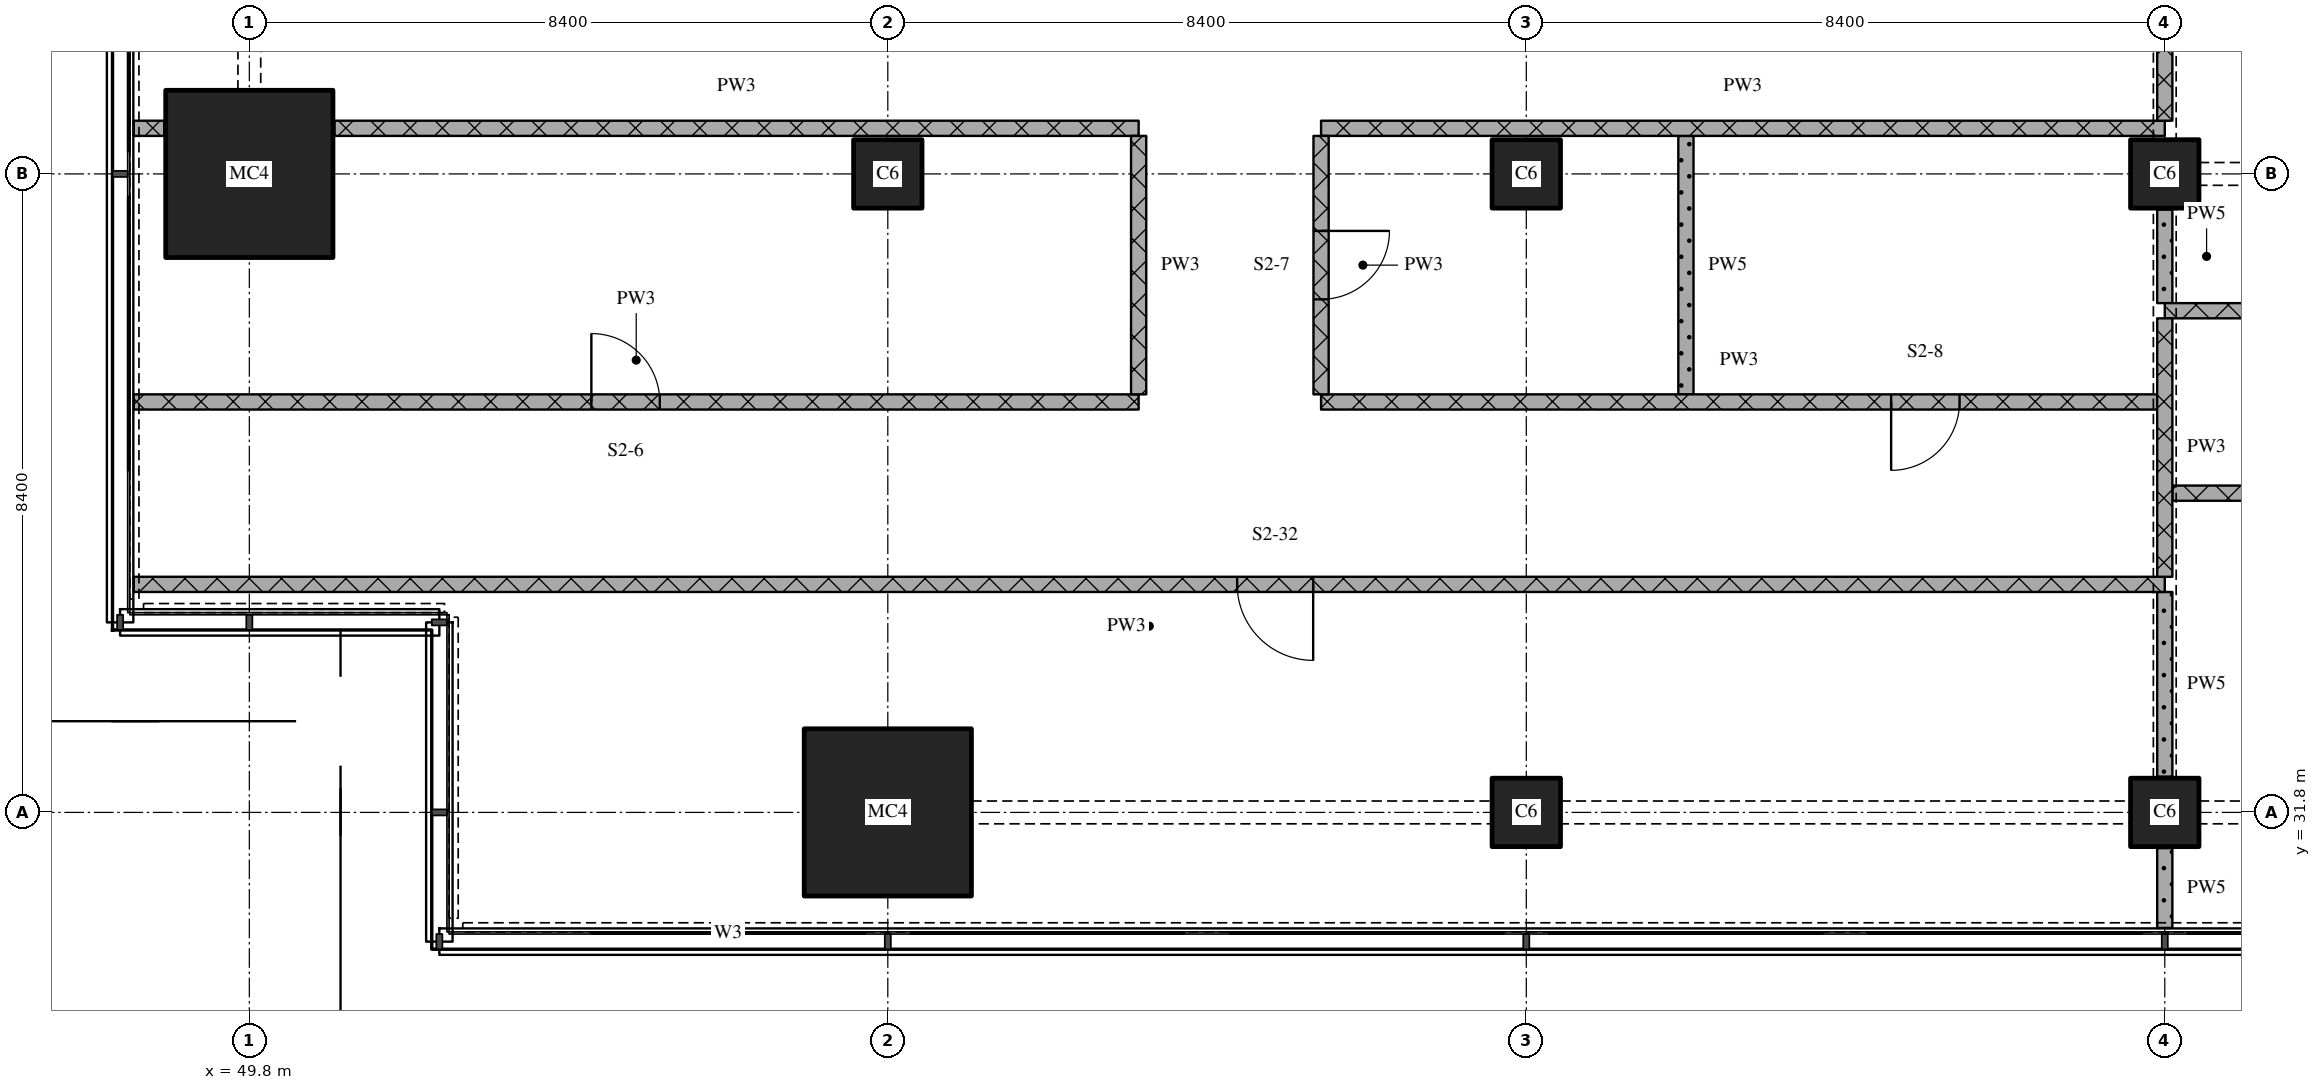
"""IFC4 building model, lengths in metres.
Left out: names, types, materials, properties, quantities, classifications, styles, units other than length and angle.
Written with IfcOpenShell. Run it as: python <this file> out.ifc"""

import sys

from ifc_helpers import new_model, si_unit, direction, frame, frame_2d, origin, origin_2d, place, context, subcontext, project, spatial, rectangle, extrude, element, fill, save


model = new_model("IFC4")
c1 = context("Model", 3, precision=1e-05, world=origin(), true_north=direction((0.0, 1.0)))
c2 = subcontext(c1, "Body", "Model", "MODEL_VIEW")
j1 = project(units=[si_unit("LENGTHUNIT", "METRE"), si_unit("PLANEANGLEUNIT", "RADIAN")], contexts=[c1])
p1 = place(None, origin())
s1 = spatial("IfcSite", under=j1, at=p1, CompositionType="ELEMENT")
p2 = place(p1, origin())
s2 = spatial("IfcBuilding", under=s1, at=p2, CompositionType="ELEMENT")
p3 = place(p2, frame((0.0, 0.0, 23.7)))
s3 = spatial("IfcBuildingStorey", under=s2, at=p3, CompositionType="ELEMENT", Elevation=23.7)
for number, where, z_axis, x_axis in (
    (1, (49.8, 40.2, 0.0), (0.0, 0.0, 1.0), (1.0, 0.0, 0.0)),
    (2, (58.2, 31.8, 0.0), (0.0, 0.0, 1.0), (1.0, 0.0, 0.0)),
):
    element("IfcColumn", number, at=place(p3, frame(where, z_axis=z_axis, x_axis=x_axis)), inside=s3, PredefinedType="COLUMN", context=c2, shape_type="SweptSolid", body=[
        extrude(rectangle(XDim=2.2, YDim=2.2, at=origin_2d()), origin(), (0.0, 0.0, 1.0), 4.5),
    ])
for number, where, z_axis, x_axis in (
    (3, (58.2, 40.2, 0.0), (0.0, 0.0, 1.0), (1.0, 0.0, 0.0)),
    (4, (66.6, 31.8, 0.0), (0.0, 0.0, 1.0), (1.0, 0.0, 0.0)),
    (5, (66.6, 40.2, 0.0), (0.0, 0.0, 1.0), (1.0, 0.0, 0.0)),
    (6, (75.0, 31.8, 0.0), (0.0, 0.0, 1.0), (1.0, 0.0, 0.0)),
    (7, (75.0, 40.2, 0.0), (0.0, 0.0, 1.0), (1.0, 0.0, 0.0)),
):
    element("IfcColumn", number, at=place(p3, frame(where, z_axis=z_axis, x_axis=x_axis)), inside=s3, PredefinedType="COLUMN", context=c2, shape_type="SweptSolid", body=[
        extrude(rectangle(XDim=0.9, YDim=0.9, at=origin_2d()), origin(), (0.0, 0.0, 1.0), 4.5),
    ])
p4 = place(p3, frame((75.0, 34.8, 0.0), z_axis=(0.0, 0.0, 1.0), x_axis=(-1.0, 0.0, 0.0)))
e8 = element("IfcWall", 8, at=p4, inside=s3, PredefinedType="PARTITIONING", context=c2, shape_type="SweptSolid", body=[
    extrude(rectangle(XDim=26.72, YDim=0.2, at=frame_2d((13.36, 0.0))), origin(), (0.0, 0.0, 1.0), 4.2),
])
p5 = place(p4, frame((11.204, 0.0, 0.0)))
e9 = element("IfcOpeningElement", 9, at=p5, cuts=e8, PredefinedType="OPENING", context=c2, shape_type="SweptSolid", body=[
    extrude(rectangle(XDim=1.0, YDim=2.1, at=frame_2d((0.5, 1.05))), frame((0.0, 0.11, 0.0), z_axis=(0.0, -1.0, 0.0), x_axis=(1.0, 0.0, 0.0)), (0.0, 0.0, 1.0), 0.22),
])
p6 = place(p3, frame((100.1, 36.0, 0.0), z_axis=(0.0, 0.0, 1.0), x_axis=(-1.0, 0.0, 0.0)))
e10 = element("IfcWall", 10, at=p6, inside=s3, PredefinedType="PARTITIONING", context=c2, shape_type="SweptSolid", body=[
    extrude(rectangle(XDim=25.0, YDim=0.2, at=frame_2d((12.5, 0.0))), origin(), (0.0, 0.0, 1.0), 4.2),
])
p7 = place(p6, frame((12.0, 0.0, 0.0)))
e11 = element("IfcOpeningElement", 11, at=p7, cuts=e10, PredefinedType="OPENING", context=c2, shape_type="SweptSolid", body=[
    extrude(rectangle(XDim=1.0, YDim=2.1, at=frame_2d((0.5, 1.05))), frame((0.0, 0.11, 0.0), z_axis=(0.0, -1.0, 0.0), x_axis=(1.0, 0.0, 0.0)), (0.0, 0.0, 1.0), 0.22),
])
p8 = place(p3, frame((48.28, 37.2, 0.0), z_axis=(0.0, 0.0, 1.0), x_axis=(1.0, 0.0, 0.0)))
e12 = element("IfcWall", 12, at=p8, inside=s3, PredefinedType="PARTITIONING", context=c2, shape_type="SweptSolid", body=[
    extrude(rectangle(XDim=13.22, YDim=0.2, at=frame_2d((6.61, 0.0))), origin(), (0.0, 0.0, 1.0), 4.2),
])
p9 = place(p8, frame((6.02, 0.0, 0.0)))
e13 = element("IfcOpeningElement", 13, at=p9, cuts=e12, PredefinedType="OPENING", context=c2, shape_type="SweptSolid", body=[
    extrude(rectangle(XDim=0.9, YDim=2.1, at=frame_2d((0.45, 1.05))), frame((0.0, 0.11, 0.0), z_axis=(0.0, -1.0, 0.0), x_axis=(1.0, 0.0, 0.0)), (0.0, 0.0, 1.0), 0.22),
])
p10 = place(p3, frame((63.9, 37.2, 0.0), z_axis=(0.0, 0.0, 1.0), x_axis=(1.0, 0.0, 0.0)))
e14 = element("IfcWall", 14, at=p10, inside=s3, PredefinedType="PARTITIONING", context=c2, shape_type="SweptSolid", body=[
    extrude(rectangle(XDim=11.0, YDim=0.2, at=frame_2d((5.5, 0.0))), origin(), (0.0, 0.0, 1.0), 4.2),
])
p11 = place(p10, frame((7.5, 0.0, 0.0)))
e15 = element("IfcOpeningElement", 15, at=p11, cuts=e14, PredefinedType="OPENING", context=c2, shape_type="SweptSolid", body=[
    extrude(rectangle(XDim=0.9, YDim=2.1, at=frame_2d((0.45, 1.05))), frame((0.0, 0.11, 0.0), z_axis=(0.0, -1.0, 0.0), x_axis=(1.0, 0.0, 0.0)), (0.0, 0.0, 1.0), 0.22),
])
p12 = place(p3, frame((75.0, 38.4, 0.0), z_axis=(0.0, 0.0, 1.0), x_axis=(1.0, 0.0, 0.0)))
e16 = element("IfcWall", 16, at=p12, inside=s3, PredefinedType="PARTITIONING", context=c2, shape_type="SweptSolid", body=[
    extrude(rectangle(XDim=11.4, YDim=0.2, at=frame_2d((5.7, 0.0))), origin(), (0.0, 0.0, 1.0), 4.2),
])
p13 = place(p12, frame((1.35, 0.0, 0.0)))
e17 = element("IfcOpeningElement", 17, at=p13, cuts=e16, PredefinedType="OPENING", context=c2, shape_type="SweptSolid", body=[
    extrude(rectangle(XDim=0.9, YDim=2.1, at=frame_2d((0.45, 1.05))), frame((0.0, 0.11, 0.0), z_axis=(0.0, -1.0, 0.0), x_axis=(1.0, 0.0, 0.0)), (0.0, 0.0, 1.0), 0.22),
])
p14 = place(p12, frame((4.65, 0.0, 0.0)))
e18 = element("IfcOpeningElement", 18, at=p14, cuts=e16, PredefinedType="OPENING", context=c2, shape_type="SweptSolid", body=[
    extrude(rectangle(XDim=0.9, YDim=2.1, at=frame_2d((0.45, 1.05))), frame((0.0, 0.11, 0.0), z_axis=(0.0, -1.0, 0.0), x_axis=(1.0, 0.0, 0.0)), (0.0, 0.0, 1.0), 0.22),
])
p15 = place(p12, frame((8.55, 0.0, 0.0)))
e19 = element("IfcOpeningElement", 19, at=p15, cuts=e16, PredefinedType="OPENING", context=c2, shape_type="SweptSolid", body=[
    extrude(rectangle(XDim=0.9, YDim=2.1, at=frame_2d((0.45, 1.05))), frame((0.0, 0.11, 0.0), z_axis=(0.0, -1.0, 0.0), x_axis=(1.0, 0.0, 0.0)), (0.0, 0.0, 1.0), 0.22),
])
p16 = place(p3, frame((48.28, 40.8, 0.0), z_axis=(0.0, 0.0, 1.0), x_axis=(1.0, 0.0, 0.0)))
e20 = element("IfcWall", 20, at=p16, inside=s3, PredefinedType="PARTITIONING", context=c2, shape_type="SweptSolid", body=[
    extrude(rectangle(XDim=0.4, YDim=0.2, at=frame_2d((0.2, 0.0))), origin(), (0.0, 0.0, 1.0), 4.2),
])
p17 = place(p3, frame((50.92, 40.8, 0.0), z_axis=(0.0, 0.0, 1.0), x_axis=(1.0, 0.0, 0.0)))
e21 = element("IfcWall", 21, at=p17, inside=s3, PredefinedType="PARTITIONING", context=c2, shape_type="SweptSolid", body=[
    extrude(rectangle(XDim=10.58, YDim=0.2, at=frame_2d((5.29, 0.0))), origin(), (0.0, 0.0, 1.0), 4.2),
])
p18 = place(p3, frame((63.9, 40.8, 0.0), z_axis=(0.0, 0.0, 1.0), x_axis=(1.0, 0.0, 0.0)))
e22 = element("IfcWall", 22, at=p18, inside=s3, PredefinedType="PARTITIONING", context=c2, shape_type="SweptSolid", body=[
    extrude(rectangle(XDim=11.1, YDim=0.2, at=frame_2d((5.55, 0.0))), origin(), (0.0, 0.0, 1.0), 4.2),
])
p19 = place(p3, frame((61.5, 40.7, 0.0), z_axis=(0.0, 0.0, 1.0), x_axis=(0.0, -1.0, 0.0)))
e23 = element("IfcWall", 23, at=p19, inside=s3, PredefinedType="PARTITIONING", context=c2, shape_type="SweptSolid", body=[
    extrude(rectangle(XDim=3.4, YDim=0.2, at=frame_2d((1.7, 0.0))), origin(), (0.0, 0.0, 1.0), 4.2),
])
p20 = place(p3, frame((63.9, 40.7, 0.0), z_axis=(0.0, 0.0, 1.0), x_axis=(0.0, -1.0, 0.0)))
e24 = element("IfcWall", 24, at=p20, inside=s3, PredefinedType="PARTITIONING", context=c2, shape_type="SweptSolid", body=[
    extrude(rectangle(XDim=3.4, YDim=0.2, at=frame_2d((1.7, 0.0))), origin(), (0.0, 0.0, 1.0), 4.2),
])
p21 = place(p20, frame((1.25, 0.0, 0.0)))
e25 = element("IfcOpeningElement", 25, at=p21, cuts=e24, PredefinedType="OPENING", context=c2, shape_type="SweptSolid", body=[
    extrude(rectangle(XDim=0.9, YDim=2.1, at=frame_2d((0.45, 1.05))), frame((0.0, 0.11, 0.0), z_axis=(0.0, -1.0, 0.0), x_axis=(1.0, 0.0, 0.0)), (0.0, 0.0, 1.0), 0.22),
])
p22 = place(p3, frame((68.7, 40.7, 0.0), z_axis=(0.0, 0.0, 1.0), x_axis=(0.0, -1.0, 0.0)))
e26 = element("IfcWall", 26, at=p22, inside=s3, PredefinedType="PARTITIONING", context=c2, shape_type="SweptSolid", body=[
    extrude(rectangle(XDim=3.4, YDim=0.2, at=frame_2d((1.7, 0.0))), origin(), (0.0, 0.0, 1.0), 4.2),
])
p23 = place(p3, frame((75.0, 38.3, 0.0), z_axis=(0.0, 0.0, 1.0), x_axis=(0.0, -1.0, 0.0)))
e27 = element("IfcWall", 27, at=p23, inside=s3, PredefinedType="PARTITIONING", context=c2, shape_type="SweptSolid", body=[
    extrude(rectangle(XDim=3.4, YDim=0.2, at=frame_2d((1.7, 0.0))), origin(), (0.0, 0.0, 1.0), 3.7),
])
p24 = place(p3, frame((75.0, 43.1, 0.0), z_axis=(0.0, 0.0, 1.0), x_axis=(0.0, -1.0, 0.0)))
e28 = element("IfcWall", 28, at=p24, inside=s3, PredefinedType="PARTITIONING", context=c2, shape_type="SweptSolid", body=[
    extrude(rectangle(XDim=2.2, YDim=0.2, at=frame_2d((1.1, 0.0))), origin(), (0.0, 0.0, 1.0), 3.3),
])
p25 = place(p3, frame((75.0, 31.33, 0.0), z_axis=(0.0, 0.0, 1.0), x_axis=(0.0, -1.0, 0.0)))
e29 = element("IfcWall", 29, at=p25, inside=s3, PredefinedType="PARTITIONING", context=c2, shape_type="SweptSolid", body=[
    extrude(rectangle(XDim=1.05, YDim=0.2, at=frame_2d((0.525, 0.0))), origin(), (0.0, 0.0, 1.0), 4.2),
])
p26 = place(p3, frame((75.0, 34.7, 0.0), z_axis=(0.0, 0.0, 1.0), x_axis=(0.0, -1.0, 0.0)))
e30 = element("IfcWall", 30, at=p26, inside=s3, PredefinedType="PARTITIONING", context=c2, shape_type="SweptSolid", body=[
    extrude(rectangle(XDim=2.43, YDim=0.2, at=frame_2d((1.215, 0.0))), origin(), (0.0, 0.0, 1.0), 3.7),
])
p27 = place(p3, frame((75.0, 39.73, 0.0), z_axis=(0.0, 0.0, 1.0), x_axis=(0.0, -1.0, 0.0)))
e31 = element("IfcWall", 31, at=p27, inside=s3, PredefinedType="PARTITIONING", context=c2, shape_type="SweptSolid", body=[
    extrude(rectangle(XDim=1.23, YDim=0.2, at=frame_2d((0.615, 0.0))), origin(), (0.0, 0.0, 1.0), 3.7),
])
p28 = place(p5, origin())
e32 = element("IfcDoor", 32, at=p28, inside=s3, OperationType="SINGLE_SWING_LEFT", PredefinedType="DOOR", context=c2, shape_type="SweptSolid", body=[
    extrude(rectangle(XDim=1.0, YDim=2.1, at=frame_2d((0.5, 1.05))), frame((0.0, 0.025, 0.0), z_axis=(0.0, -1.0, 0.0), x_axis=(1.0, 0.0, 0.0)), (0.0, 0.0, 1.0), 0.05),
])
fill(e9, e32)
p29 = place(p9, origin())
e33 = element("IfcDoor", 33, at=p29, inside=s3, OperationType="SINGLE_SWING_LEFT", PredefinedType="DOOR", context=c2, shape_type="SweptSolid", body=[
    extrude(rectangle(XDim=0.9, YDim=2.1, at=frame_2d((0.45, 1.05))), frame((0.0, 0.025, 0.0), z_axis=(0.0, -1.0, 0.0), x_axis=(1.0, 0.0, 0.0)), (0.0, 0.0, 1.0), 0.05),
])
fill(e13, e33)
p30 = place(p11, origin())
e34 = element("IfcDoor", 34, at=p30, inside=s3, OperationType="SINGLE_SWING_RIGHT", PredefinedType="DOOR", context=c2, shape_type="SweptSolid", body=[
    extrude(rectangle(XDim=0.9, YDim=2.1, at=frame_2d((0.45, 1.05))), frame((0.0, 0.025, 0.0), z_axis=(0.0, -1.0, 0.0), x_axis=(1.0, 0.0, 0.0)), (0.0, 0.0, 1.0), 0.05),
])
fill(e15, e34)
p31 = place(p21, origin())
e35 = element("IfcDoor", 35, at=p31, inside=s3, OperationType="SINGLE_SWING_LEFT", PredefinedType="DOOR", context=c2, shape_type="SweptSolid", body=[
    extrude(rectangle(XDim=0.9, YDim=2.1, at=frame_2d((0.45, 1.05))), frame((0.0, 0.025, 0.0), z_axis=(0.0, -1.0, 0.0), x_axis=(1.0, 0.0, 0.0)), (0.0, 0.0, 1.0), 0.05),
])
fill(e25, e35)
save(model, sys.argv[1])
